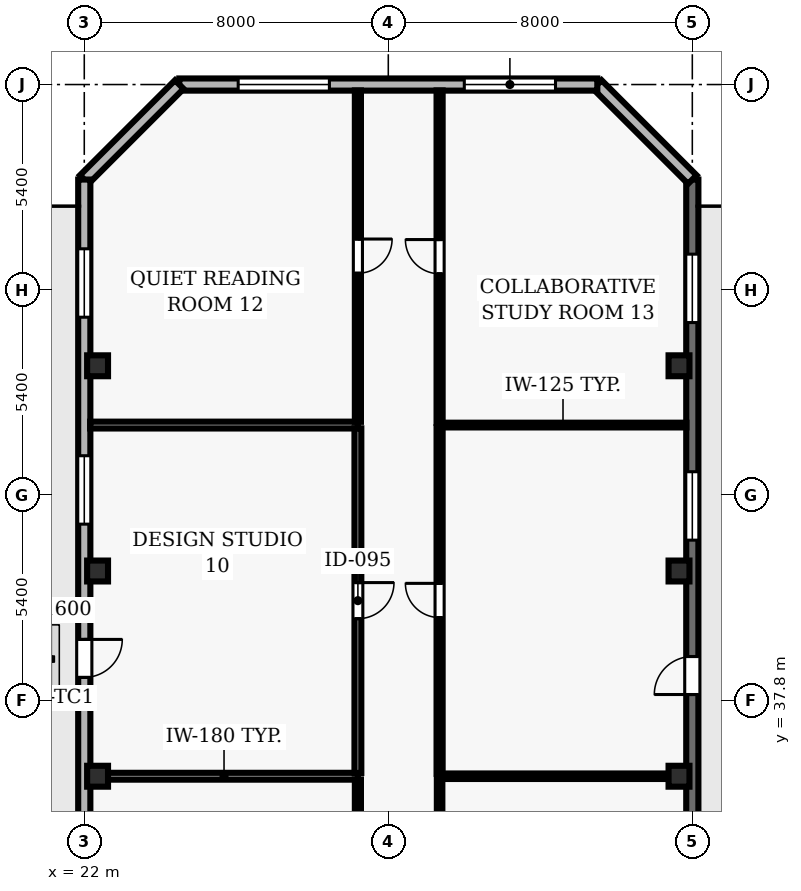
"""IFC4 building model, lengths in metres.
Left out: names, types, materials, properties, quantities, classifications, styles, units other than length and angle.
Written with IfcOpenShell. Run it as: python <this file> out.ifc"""

import sys

from ifc_helpers import new_model, si_unit, direction, frame, frame_2d, origin, origin_2d, place, context, subcontext, project, spatial, rectangle, hollow_rectangle, extrude, element, fill, save


model = new_model("IFC4")
c1 = context("Model", 3, precision=1e-05, world=origin(), true_north=direction((0.0, 1.0)))
c2 = subcontext(c1, "Body", "Model", "MODEL_VIEW")
j1 = project(units=[si_unit("LENGTHUNIT", "METRE"), si_unit("PLANEANGLEUNIT", "RADIAN")], contexts=[c1])
p1 = place(None, origin())
s1 = spatial("IfcSite", under=j1, at=p1, CompositionType="ELEMENT")
p2 = place(p1, origin())
s2 = spatial("IfcBuilding", under=s1, at=p2, CompositionType="ELEMENT")
p3 = place(p2, frame((0.0, 0.0, 31.0)))
s3 = spatial("IfcBuildingStorey", under=s2, at=p3, CompositionType="ELEMENT", Elevation=31.0)
for number, where, z_axis, x_axis in (
    (1, (22.35, 35.8, 0.0), (0.0, 0.0, 1.0), (1.0, 0.0, 0.0)),
    (2, (37.65, 35.8, 0.0), (0.0, 0.0, 1.0), (1.0, 0.0, 0.0)),
    (3, (22.35, 41.2, 0.0), (0.0, 0.0, 1.0), (1.0, 0.0, 0.0)),
    (4, (37.65, 41.2, 0.0), (0.0, 0.0, 1.0), (1.0, 0.0, 0.0)),
    (5, (22.35, 46.6, 0.0), (0.0, 0.0, 1.0), (1.0, 0.0, 0.0)),
    (6, (37.65, 46.6, 0.0), (0.0, 0.0, 1.0), (1.0, 0.0, 0.0)),
):
    element("IfcColumn", number, at=place(p3, frame(where, z_axis=z_axis, x_axis=x_axis)), inside=s3, PredefinedType="COLUMN", context=c2, shape_type="SweptSolid", body=[
        extrude(hollow_rectangle(XDim=0.55, YDim=0.55, WallThickness=0.025, at=origin_2d()), origin(), (0.0, 0.0, 1.0), 3.9),
    ])
p4 = place(p3, frame((38.0, 28.6, 0.0), z_axis=(0.0, 0.0, 1.0), x_axis=(0.0, 1.0, 0.0)))
e7 = element("IfcWall", 7, at=p4, inside=s3, PredefinedType="SOLIDWALL", context=c2, shape_type="SweptSolid", body=[
    extrude(rectangle(XDim=22.9, YDim=0.32, at=frame_2d((11.45, 0.0))), origin(), (0.0, 0.0, 1.0), 3.69),
])
p5 = place(p4, frame((9.35, 0.0, 0.0)))
e8 = element("IfcOpeningElement", 8, at=p5, cuts=e7, PredefinedType="OPENING", context=c2, shape_type="SweptSolid", body=[
    extrude(rectangle(XDim=1.0, YDim=2.2, at=frame_2d((0.5, 1.1))), frame((0.0, 0.17, 0.0), z_axis=(0.0, -1.0, 0.0), x_axis=(1.0, 0.0, 0.0)), (0.0, 0.0, 1.0), 0.34),
])
p6 = place(p4, frame((1.962, 0.0, 0.9)))
e9 = element("IfcOpeningElement", 9, at=p6, cuts=e7, PredefinedType="OPENING", context=c2, shape_type="SweptSolid", body=[
    extrude(rectangle(XDim=1.8, YDim=1.6, at=frame_2d((0.9, 0.8))), frame((0.0, 0.17, 0.0), z_axis=(0.0, -1.0, 0.0), x_axis=(1.0, 0.0, 0.0)), (0.0, 0.0, 1.0), 0.34),
])
p7 = place(p4, frame((13.412, 0.0, 0.9)))
e10 = element("IfcOpeningElement", 10, at=p7, cuts=e7, PredefinedType="OPENING", context=c2, shape_type="SweptSolid", body=[
    extrude(rectangle(XDim=1.8, YDim=1.6, at=frame_2d((0.9, 0.8))), frame((0.0, 0.17, 0.0), z_axis=(0.0, -1.0, 0.0), x_axis=(1.0, 0.0, 0.0)), (0.0, 0.0, 1.0), 0.34),
])
p8 = place(p4, frame((19.137, 0.0, 0.9)))
e11 = element("IfcOpeningElement", 11, at=p8, cuts=e7, PredefinedType="OPENING", context=c2, shape_type="SweptSolid", body=[
    extrude(rectangle(XDim=1.8, YDim=1.6, at=frame_2d((0.9, 0.8))), frame((0.0, 0.17, 0.0), z_axis=(0.0, -1.0, 0.0), x_axis=(1.0, 0.0, 0.0)), (0.0, 0.0, 1.0), 0.34),
])
p9 = place(p3, frame((38.0, 51.5, 0.0), z_axis=(0.0, 0.0, 1.0), x_axis=(-0.707106781187, 0.707106781187, 0.0)))
e12 = element("IfcWall", 12, at=p9, inside=s3, PredefinedType="SOLIDWALL", context=c2, shape_type="SweptSolid", body=[
    extrude(rectangle(XDim=3.536, YDim=0.32, at=frame_2d((1.768, 0.0))), origin(), (0.0, 0.0, 1.0), 3.69),
])
p10 = place(p3, frame((35.5, 54.0, 0.0), z_axis=(0.0, 0.0, 1.0), x_axis=(-1.0, 0.0, 0.0)))
e13 = element("IfcWall", 13, at=p10, inside=s3, PredefinedType="SOLIDWALL", context=c2, shape_type="SweptSolid", body=[
    extrude(rectangle(XDim=11.0, YDim=0.32, at=frame_2d((5.5, 0.0))), origin(), (0.0, 0.0, 1.0), 3.69),
])
p11 = place(p10, frame((1.1, 0.0, 0.9)))
e14 = element("IfcOpeningElement", 14, at=p11, cuts=e13, PredefinedType="OPENING", context=c2, shape_type="SweptSolid", body=[
    extrude(rectangle(XDim=2.4, YDim=1.6, at=frame_2d((1.2, 0.8))), frame((0.0, 0.17, 0.0), z_axis=(0.0, -1.0, 0.0), x_axis=(1.0, 0.0, 0.0)), (0.0, 0.0, 1.0), 0.34),
])
p12 = place(p10, frame((7.05, 0.0, 0.9)))
e15 = element("IfcOpeningElement", 15, at=p12, cuts=e13, PredefinedType="OPENING", context=c2, shape_type="SweptSolid", body=[
    extrude(rectangle(XDim=2.4, YDim=1.6, at=frame_2d((1.2, 0.8))), frame((0.0, 0.17, 0.0), z_axis=(0.0, -1.0, 0.0), x_axis=(1.0, 0.0, 0.0)), (0.0, 0.0, 1.0), 0.34),
])
p13 = place(p3, frame((24.5, 54.0, 0.0), z_axis=(0.0, 0.0, 1.0), x_axis=(-0.707106781187, -0.707106781187, 0.0)))
e16 = element("IfcWall", 16, at=p13, inside=s3, PredefinedType="SOLIDWALL", context=c2, shape_type="SweptSolid", body=[
    extrude(rectangle(XDim=3.536, YDim=0.32, at=frame_2d((1.768, 0.0))), origin(), (0.0, 0.0, 1.0), 3.69),
])
p14 = place(p3, frame((22.0, 51.5, 0.0), z_axis=(0.0, 0.0, 1.0), x_axis=(0.0, -1.0, 0.0)))
e17 = element("IfcWall", 17, at=p14, inside=s3, PredefinedType="SOLIDWALL", context=c2, shape_type="SweptSolid", body=[
    extrude(rectangle(XDim=49.0, YDim=0.32, at=frame_2d((24.5, 0.0))), origin(), (0.0, 0.0, 1.0), 3.69),
])
p15 = place(p14, frame((12.1, 0.0, 0.0)))
e18 = element("IfcOpeningElement", 18, at=p15, cuts=e17, PredefinedType="OPENING", context=c2, shape_type="SweptSolid", body=[
    extrude(rectangle(XDim=1.0, YDim=2.2, at=frame_2d((0.5, 1.1))), frame((0.0, 0.17, 0.0), z_axis=(0.0, -1.0, 0.0), x_axis=(1.0, 0.0, 0.0)), (0.0, 0.0, 1.0), 0.34),
])
p16 = place(p14, frame((1.822, 0.0, 0.9)))
e19 = element("IfcOpeningElement", 19, at=p16, cuts=e17, PredefinedType="OPENING", context=c2, shape_type="SweptSolid", body=[
    extrude(rectangle(XDim=1.8, YDim=1.8, at=frame_2d((0.9, 0.9))), frame((0.0, 0.17, 0.0), z_axis=(0.0, -1.0, 0.0), x_axis=(1.0, 0.0, 0.0)), (0.0, 0.0, 1.0), 0.34),
])
p17 = place(p14, frame((7.267, 0.0, 0.9)))
e20 = element("IfcOpeningElement", 20, at=p17, cuts=e17, PredefinedType="OPENING", context=c2, shape_type="SweptSolid", body=[
    extrude(rectangle(XDim=1.8, YDim=1.8, at=frame_2d((0.9, 0.9))), frame((0.0, 0.17, 0.0), z_axis=(0.0, -1.0, 0.0), x_axis=(1.0, 0.0, 0.0)), (0.0, 0.0, 1.0), 0.34),
])
p18 = place(p14, frame((18.156, 0.0, 0.9)))
e21 = element("IfcOpeningElement", 21, at=p18, cuts=e17, PredefinedType="OPENING", context=c2, shape_type="SweptSolid", body=[
    extrude(rectangle(XDim=1.8, YDim=1.8, at=frame_2d((0.9, 0.9))), frame((0.0, 0.17, 0.0), z_axis=(0.0, -1.0, 0.0), x_axis=(1.0, 0.0, 0.0)), (0.0, 0.0, 1.0), 0.34),
])
p19 = place(p14, frame((23.15, 0.0, 0.9)))
e22 = element("IfcOpeningElement", 22, at=p19, cuts=e17, PredefinedType="OPENING", context=c2, shape_type="SweptSolid", body=[
    extrude(rectangle(XDim=1.8, YDim=1.8, at=frame_2d((0.9, 0.9))), frame((0.0, 0.17, 0.0), z_axis=(0.0, -1.0, 0.0), x_axis=(1.0, 0.0, 0.0)), (0.0, 0.0, 1.0), 0.34),
])
p20 = place(p14, frame((29.044, 0.0, 0.9)))
e23 = element("IfcOpeningElement", 23, at=p20, cuts=e17, PredefinedType="OPENING", context=c2, shape_type="SweptSolid", body=[
    extrude(rectangle(XDim=1.8, YDim=1.8, at=frame_2d((0.9, 0.9))), frame((0.0, 0.17, 0.0), z_axis=(0.0, -1.0, 0.0), x_axis=(1.0, 0.0, 0.0)), (0.0, 0.0, 1.0), 0.34),
])
p21 = place(p14, frame((34.039, 0.0, 0.9)))
e24 = element("IfcOpeningElement", 24, at=p21, cuts=e17, PredefinedType="OPENING", context=c2, shape_type="SweptSolid", body=[
    extrude(rectangle(XDim=1.8, YDim=1.8, at=frame_2d((0.9, 0.9))), frame((0.0, 0.17, 0.0), z_axis=(0.0, -1.0, 0.0), x_axis=(1.0, 0.0, 0.0)), (0.0, 0.0, 1.0), 0.34),
])
p22 = place(p14, frame((39.933, 0.0, 0.9)))
e25 = element("IfcOpeningElement", 25, at=p22, cuts=e17, PredefinedType="OPENING", context=c2, shape_type="SweptSolid", body=[
    extrude(rectangle(XDim=1.8, YDim=1.8, at=frame_2d((0.9, 0.9))), frame((0.0, 0.17, 0.0), z_axis=(0.0, -1.0, 0.0), x_axis=(1.0, 0.0, 0.0)), (0.0, 0.0, 1.0), 0.34),
])
p23 = place(p3, frame((29.2, 35.8, 0.0), z_axis=(0.0, 0.0, 1.0), x_axis=(-1.0, 0.0, 0.0)))
e26 = element("IfcWall", 26, at=p23, inside=s3, PredefinedType="PARTITIONING", context=c2, shape_type="SweptSolid", body=[
    extrude(rectangle(XDim=7.045, YDim=0.18, at=frame_2d((3.522, 0.0))), origin(), (0.0, 0.0, 1.0), 2.995),
])
p24 = place(p3, frame((29.2, 45.04, 0.0), z_axis=(0.0, 0.0, 1.0), x_axis=(-1.0, 0.0, 0.0)))
e27 = element("IfcWall", 27, at=p24, inside=s3, PredefinedType="PARTITIONING", context=c2, shape_type="SweptSolid", body=[
    extrude(rectangle(XDim=7.045, YDim=0.18, at=frame_2d((3.522, 0.0))), origin(), (0.0, 0.0, 1.0), 3.69),
])
p25 = place(p3, frame((37.845, 35.8, 0.0), z_axis=(0.0, 0.0, 1.0), x_axis=(-1.0, 0.0, 0.0)))
e28 = element("IfcWall", 28, at=p25, inside=s3, PredefinedType="PARTITIONING", context=c2, shape_type="SweptSolid", body=[
    extrude(rectangle(XDim=6.495, YDim=0.145, at=frame_2d((3.248, 0.0))), origin(), (0.0, 0.0, 1.0), 2.995),
])
p26 = place(p3, frame((37.845, 45.04, 0.0), z_axis=(0.0, 0.0, 1.0), x_axis=(-1.0, 0.0, 0.0)))
e29 = element("IfcWall", 29, at=p26, inside=s3, PredefinedType="PARTITIONING", context=c2, shape_type="SweptSolid", body=[
    extrude(rectangle(XDim=6.495, YDim=0.125, at=frame_2d((3.248, 0.0))), origin(), (0.0, 0.0, 1.0), 3.69),
])
p27 = place(p3, frame((29.2, 35.715, 0.0), z_axis=(0.0, 0.0, 1.0), x_axis=(0.0, -1.0, 0.0)))
e30 = element("IfcWall", 30, at=p27, inside=s3, PredefinedType="PARTITIONING", context=c2, shape_type="SweptSolid", body=[
    extrude(rectangle(XDim=9.64, YDim=0.16, at=frame_2d((4.82, 0.0))), origin(), (0.0, 0.0, 1.0), 3.69),
])
p28 = place(p27, frame((4.32, 0.0, 0.0)))
e31 = element("IfcOpeningElement", 31, at=p28, cuts=e30, PredefinedType="OPENING", context=c2, shape_type="SweptSolid", body=[
    extrude(rectangle(XDim=1.0, YDim=2.1, at=frame_2d((0.5, 1.05))), frame((0.0, 0.09, 0.0), z_axis=(0.0, -1.0, 0.0), x_axis=(1.0, 0.0, 0.0)), (0.0, 0.0, 1.0), 0.18),
])
p29 = place(p3, frame((29.2, 44.955, 0.0), z_axis=(0.0, 0.0, 1.0), x_axis=(0.0, -1.0, 0.0)))
e32 = element("IfcWall", 32, at=p29, inside=s3, PredefinedType="PARTITIONING", context=c2, shape_type="SweptSolid", body=[
    extrude(rectangle(XDim=9.07, YDim=0.18, at=frame_2d((4.535, 0.0))), origin(), (0.0, 0.0, 1.0), 3.69),
])
p30 = place(p29, frame((4.06, 0.0, 0.0)))
e33 = element("IfcOpeningElement", 33, at=p30, cuts=e32, PredefinedType="OPENING", context=c2, shape_type="SweptSolid", body=[
    extrude(rectangle(XDim=0.95, YDim=2.1, at=frame_2d((0.475, 1.05))), frame((0.0, 0.1, 0.0), z_axis=(0.0, -1.0, 0.0), x_axis=(1.0, 0.0, 0.0)), (0.0, 0.0, 1.0), 0.2),
])
p31 = place(p3, frame((29.2, 53.845, 0.0), z_axis=(0.0, 0.0, 1.0), x_axis=(0.0, -1.0, 0.0)))
e34 = element("IfcWall", 34, at=p31, inside=s3, PredefinedType="PARTITIONING", context=c2, shape_type="SweptSolid", body=[
    extrude(rectangle(XDim=8.72, YDim=0.16, at=frame_2d((4.36, 0.0))), origin(), (0.0, 0.0, 1.0), 3.69),
])
p32 = place(p31, frame((3.91, 0.0, 0.0)))
e35 = element("IfcOpeningElement", 35, at=p32, cuts=e34, PredefinedType="OPENING", context=c2, shape_type="SweptSolid", body=[
    extrude(rectangle(XDim=0.9, YDim=2.1, at=frame_2d((0.45, 1.05))), frame((0.0, 0.09, 0.0), z_axis=(0.0, -1.0, 0.0), x_axis=(1.0, 0.0, 0.0)), (0.0, 0.0, 1.0), 0.18),
])
p33 = place(p3, frame((31.35, 26.075, 0.0), z_axis=(0.0, 0.0, 1.0), x_axis=(0.0, 1.0, 0.0)))
e36 = element("IfcWall", 36, at=p33, inside=s3, PredefinedType="PARTITIONING", context=c2, shape_type="SweptSolid", body=[
    extrude(rectangle(XDim=9.657, YDim=0.145, at=frame_2d((4.829, 0.0))), origin(), (0.0, 0.0, 1.0), 3.69),
])
p34 = place(p33, frame((4.279, 0.0, 0.0)))
e37 = element("IfcOpeningElement", 37, at=p34, cuts=e36, PredefinedType="OPENING", context=c2, shape_type="SweptSolid", body=[
    extrude(rectangle(XDim=1.1, YDim=2.15, at=frame_2d((0.55, 1.075))), frame((0.0, 0.083, 0.0), z_axis=(0.0, -1.0, 0.0), x_axis=(1.0, 0.0, 0.0)), (0.0, 0.0, 1.0), 0.165),
])
p35 = place(p3, frame((31.35, 35.867, 0.0), z_axis=(0.0, 0.0, 1.0), x_axis=(0.0, 1.0, 0.0)))
e38 = element("IfcWall", 38, at=p35, inside=s3, PredefinedType="PARTITIONING", context=c2, shape_type="SweptSolid", body=[
    extrude(rectangle(XDim=9.116, YDim=0.16, at=frame_2d((4.558, 0.0))), origin(), (0.0, 0.0, 1.0), 3.69),
])
p36 = place(p35, frame((4.108, 0.0, 0.0)))
e39 = element("IfcOpeningElement", 39, at=p36, cuts=e38, PredefinedType="OPENING", context=c2, shape_type="SweptSolid", body=[
    extrude(rectangle(XDim=0.9, YDim=2.1, at=frame_2d((0.45, 1.05))), frame((0.0, 0.09, 0.0), z_axis=(0.0, -1.0, 0.0), x_axis=(1.0, 0.0, 0.0)), (0.0, 0.0, 1.0), 0.18),
])
p37 = place(p3, frame((31.35, 45.097, 0.0), z_axis=(0.0, 0.0, 1.0), x_axis=(0.0, 1.0, 0.0)))
e40 = element("IfcWall", 40, at=p37, inside=s3, PredefinedType="PARTITIONING", context=c2, shape_type="SweptSolid", body=[
    extrude(rectangle(XDim=8.748, YDim=0.16, at=frame_2d((4.374, 0.0))), origin(), (0.0, 0.0, 1.0), 3.69),
])
p38 = place(p37, frame((3.924, 0.0, 0.0)))
e41 = element("IfcOpeningElement", 41, at=p38, cuts=e40, PredefinedType="OPENING", context=c2, shape_type="SweptSolid", body=[
    extrude(rectangle(XDim=0.9, YDim=2.1, at=frame_2d((0.45, 1.05))), frame((0.0, 0.09, 0.0), z_axis=(0.0, -1.0, 0.0), x_axis=(1.0, 0.0, 0.0)), (0.0, 0.0, 1.0), 0.18),
])
p39 = place(p5, origin())
e42 = element("IfcDoor", 42, at=p39, inside=s3, OperationType="SINGLE_SWING_LEFT", PredefinedType="DOOR", context=c2, shape_type="SweptSolid", body=[
    extrude(rectangle(XDim=1.0, YDim=2.2, at=frame_2d((0.5, 1.1))), frame((0.0, 0.025, 0.0), z_axis=(0.0, -1.0, 0.0), x_axis=(1.0, 0.0, 0.0)), (0.0, 0.0, 1.0), 0.05),
])
fill(e8, e42)
p40 = place(p7, origin())
e43 = element("IfcWindow", 43, at=p40, inside=s3, PartitioningType="SINGLE_PANEL", PredefinedType="WINDOW", context=c2, shape_type="SweptSolid", body=[
    extrude(rectangle(XDim=1.8, YDim=1.6, at=frame_2d((0.9, 0.8))), frame((0.0, 0.03, 0.0), z_axis=(0.0, -1.0, 0.0), x_axis=(1.0, 0.0, 0.0)), (0.0, 0.0, 1.0), 0.06),
])
fill(e10, e43)
p41 = place(p8, origin())
e44 = element("IfcWindow", 44, at=p41, inside=s3, PartitioningType="SINGLE_PANEL", PredefinedType="WINDOW", context=c2, shape_type="SweptSolid", body=[
    extrude(rectangle(XDim=1.8, YDim=1.6, at=frame_2d((0.9, 0.8))), frame((0.0, 0.03, 0.0), z_axis=(0.0, -1.0, 0.0), x_axis=(1.0, 0.0, 0.0)), (0.0, 0.0, 1.0), 0.06),
])
fill(e11, e44)
p42 = place(p11, origin())
e45 = element("IfcWindow", 45, at=p42, inside=s3, PartitioningType="SINGLE_PANEL", PredefinedType="WINDOW", context=c2, shape_type="SweptSolid", body=[
    extrude(rectangle(XDim=2.4, YDim=1.6, at=frame_2d((1.2, 0.8))), frame((0.0, 0.03, 0.0), z_axis=(0.0, -1.0, 0.0), x_axis=(1.0, 0.0, 0.0)), (0.0, 0.0, 1.0), 0.06),
])
fill(e14, e45)
p43 = place(p12, origin())
e46 = element("IfcWindow", 46, at=p43, inside=s3, PartitioningType="SINGLE_PANEL", PredefinedType="WINDOW", context=c2, shape_type="SweptSolid", body=[
    extrude(rectangle(XDim=2.4, YDim=1.6, at=frame_2d((1.2, 0.8))), frame((0.0, 0.03, 0.0), z_axis=(0.0, -1.0, 0.0), x_axis=(1.0, 0.0, 0.0)), (0.0, 0.0, 1.0), 0.06),
])
fill(e15, e46)
p44 = place(p15, origin())
e47 = element("IfcDoor", 47, at=p44, inside=s3, OperationType="SINGLE_SWING_LEFT", PredefinedType="DOOR", context=c2, shape_type="SweptSolid", body=[
    extrude(rectangle(XDim=1.0, YDim=2.2, at=frame_2d((0.5, 1.1))), frame((0.0, 0.025, 0.0), z_axis=(0.0, -1.0, 0.0), x_axis=(1.0, 0.0, 0.0)), (0.0, 0.0, 1.0), 0.05),
])
fill(e18, e47)
p45 = place(p16, origin())
e48 = element("IfcWindow", 48, at=p45, inside=s3, PartitioningType="SINGLE_PANEL", PredefinedType="WINDOW", context=c2, shape_type="SweptSolid", body=[
    extrude(rectangle(XDim=1.8, YDim=1.8, at=frame_2d((0.9, 0.9))), frame((0.0, 0.03, 0.0), z_axis=(0.0, -1.0, 0.0), x_axis=(1.0, 0.0, 0.0)), (0.0, 0.0, 1.0), 0.06),
])
fill(e19, e48)
p46 = place(p17, origin())
e49 = element("IfcWindow", 49, at=p46, inside=s3, PartitioningType="SINGLE_PANEL", PredefinedType="WINDOW", context=c2, shape_type="SweptSolid", body=[
    extrude(rectangle(XDim=1.8, YDim=1.8, at=frame_2d((0.9, 0.9))), frame((0.0, 0.03, 0.0), z_axis=(0.0, -1.0, 0.0), x_axis=(1.0, 0.0, 0.0)), (0.0, 0.0, 1.0), 0.06),
])
fill(e20, e49)
p47 = place(p30, origin())
e50 = element("IfcDoor", 50, at=p47, inside=s3, OperationType="SINGLE_SWING_LEFT", PredefinedType="DOOR", context=c2, shape_type="SweptSolid", body=[
    extrude(rectangle(XDim=0.95, YDim=2.1, at=frame_2d((0.475, 1.05))), frame((0.0, 0.025, 0.0), z_axis=(0.0, -1.0, 0.0), x_axis=(1.0, 0.0, 0.0)), (0.0, 0.0, 1.0), 0.05),
])
fill(e33, e50)
p48 = place(p36, origin())
e51 = element("IfcDoor", 51, at=p48, inside=s3, OperationType="SINGLE_SWING_RIGHT", PredefinedType="DOOR", context=c2, shape_type="SweptSolid", body=[
    extrude(rectangle(XDim=0.9, YDim=2.1, at=frame_2d((0.45, 1.05))), frame((0.0, 0.025, 0.0), z_axis=(0.0, -1.0, 0.0), x_axis=(1.0, 0.0, 0.0)), (0.0, 0.0, 1.0), 0.05),
])
fill(e39, e51)
p49 = place(p32, origin())
e52 = element("IfcDoor", 52, at=p49, inside=s3, OperationType="SINGLE_SWING_LEFT", PredefinedType="DOOR", context=c2, shape_type="SweptSolid", body=[
    extrude(rectangle(XDim=0.9, YDim=2.1, at=frame_2d((0.45, 1.05))), frame((0.0, 0.025, 0.0), z_axis=(0.0, -1.0, 0.0), x_axis=(1.0, 0.0, 0.0)), (0.0, 0.0, 1.0), 0.05),
])
fill(e35, e52)
p50 = place(p38, origin())
e53 = element("IfcDoor", 53, at=p50, inside=s3, OperationType="SINGLE_SWING_RIGHT", PredefinedType="DOOR", context=c2, shape_type="SweptSolid", body=[
    extrude(rectangle(XDim=0.9, YDim=2.1, at=frame_2d((0.45, 1.05))), frame((0.0, 0.025, 0.0), z_axis=(0.0, -1.0, 0.0), x_axis=(1.0, 0.0, 0.0)), (0.0, 0.0, 1.0), 0.05),
])
fill(e41, e53)
save(model, sys.argv[1])
